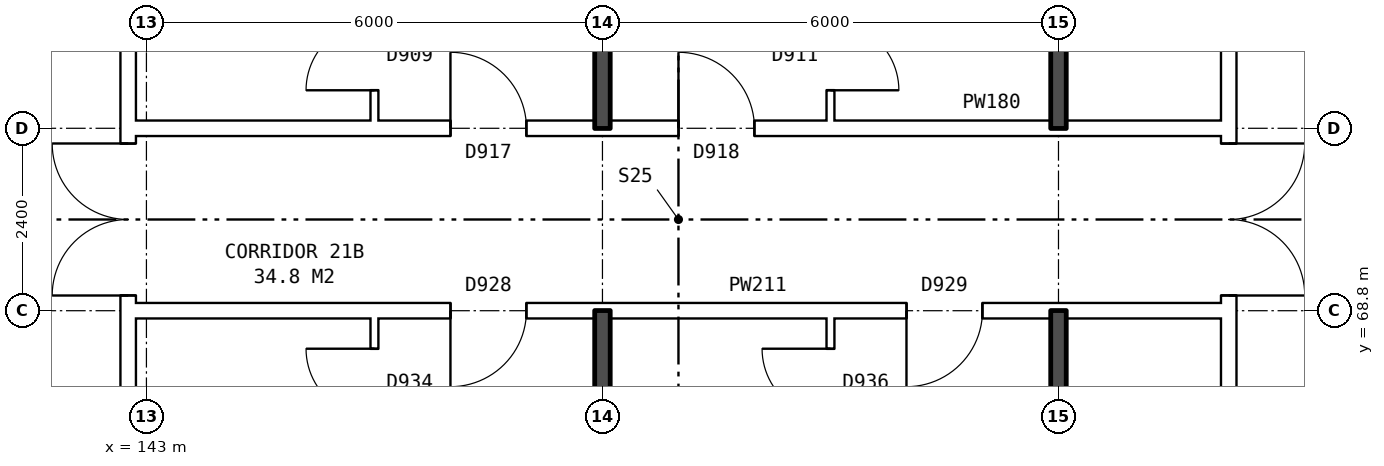
"""IFC4 building model, lengths in metres.
Left out: names, types, materials, properties, quantities, classifications, styles, units other than length and angle.
Written with IfcOpenShell. Run it as: python <this file> out.ifc"""

import sys

from ifc_helpers import new_model, si_unit, direction, frame, frame_2d, origin, place, context, subcontext, project, spatial, rectangle, extrude, element, fill, save


model = new_model("IFC4")
c1 = context("Model", 3, precision=1e-05, world=origin(), true_north=direction((0.0, 1.0)))
c2 = subcontext(c1, "Body", "Model", "MODEL_VIEW")
j1 = project(units=[si_unit("LENGTHUNIT", "METRE"), si_unit("PLANEANGLEUNIT", "RADIAN")], contexts=[c1])
p1 = place(None, origin())
s1 = spatial("IfcSite", under=j1, at=p1, CompositionType="ELEMENT")
p2 = place(p1, origin())
s2 = spatial("IfcBuilding", under=s1, at=p2, CompositionType="ELEMENT")
p3 = place(p2, frame((0.0, 0.0, 77.8)))
s3 = spatial("IfcBuildingStorey", under=s2, at=p3, CompositionType="ELEMENT", Elevation=77.8)
p4 = place(p3, frame((142.76, 63.9, 0.0), z_axis=(0.0, 0.0, 1.0), x_axis=(0.0, 1.0, 0.0)))
e1 = element("IfcWall", 1, at=p4, inside=s3, PredefinedType="PARTITIONING", context=c2, shape_type="SweptSolid", body=[
    extrude(rectangle(XDim=12.2, YDim=0.2, at=frame_2d((6.1, 0.0))), origin(), (0.0, 0.0, 1.0), 2.85),
])
p5 = place(p4, frame((5.1, 0.0, 0.0)))
e2 = element("IfcOpeningElement", 2, at=p5, cuts=e1, PredefinedType="OPENING", context=c2, shape_type="SweptSolid", body=[
    extrude(rectangle(XDim=2.0, YDim=2.1, at=frame_2d((1.0, 1.05))), frame((0.0, 0.11, 0.0), z_axis=(0.0, -1.0, 0.0), x_axis=(1.0, 0.0, 0.0)), (0.0, 0.0, 1.0), 0.22),
])
p6 = place(p3, frame((157.24, 63.9, 0.0), z_axis=(0.0, 0.0, 1.0), x_axis=(0.0, 1.0, 0.0)))
e3 = element("IfcWall", 3, at=p6, inside=s3, PredefinedType="PARTITIONING", context=c2, shape_type="SweptSolid", body=[
    extrude(rectangle(XDim=12.2, YDim=0.2, at=frame_2d((6.1, 0.0))), origin(), (0.0, 0.0, 1.0), 2.85),
])
p7 = place(p6, frame((5.1, 0.0, 0.0)))
e4 = element("IfcOpeningElement", 4, at=p7, cuts=e3, PredefinedType="OPENING", context=c2, shape_type="SweptSolid", body=[
    extrude(rectangle(XDim=2.0, YDim=2.1, at=frame_2d((1.0, 1.05))), frame((0.0, 0.11, 0.0), z_axis=(0.0, -1.0, 0.0), x_axis=(1.0, 0.0, 0.0)), (0.0, 0.0, 1.0), 0.22),
])
p8 = place(p3, frame((142.76, 68.8, 0.0), z_axis=(0.0, 0.0, 1.0), x_axis=(1.0, 0.0, 0.0)))
e5 = element("IfcWall", 5, at=p8, inside=s3, PredefinedType="PARTITIONING", context=c2, shape_type="SweptSolid", body=[
    extrude(rectangle(XDim=14.48, YDim=0.2, at=frame_2d((7.24, 0.0))), origin(), (0.0, 0.0, 1.0), 2.85),
])
p9 = place(p8, frame((4.24, 0.0, 0.0)))
e6 = element("IfcOpeningElement", 6, at=p9, cuts=e5, PredefinedType="OPENING", context=c2, shape_type="SweptSolid", body=[
    extrude(rectangle(XDim=1.0, YDim=2.1, at=frame_2d((0.5, 1.05))), frame((0.0, 0.11, 0.0), z_axis=(0.0, -1.0, 0.0), x_axis=(1.0, 0.0, 0.0)), (0.0, 0.0, 1.0), 0.22),
])
p10 = place(p8, frame((10.24, 0.0, 0.0)))
e7 = element("IfcOpeningElement", 7, at=p10, cuts=e5, PredefinedType="OPENING", context=c2, shape_type="SweptSolid", body=[
    extrude(rectangle(XDim=1.0, YDim=2.1, at=frame_2d((0.5, 1.05))), frame((0.0, 0.11, 0.0), z_axis=(0.0, -1.0, 0.0), x_axis=(1.0, 0.0, 0.0)), (0.0, 0.0, 1.0), 0.22),
])
p11 = place(p3, frame((142.76, 71.2, 0.0), z_axis=(0.0, 0.0, 1.0), x_axis=(1.0, 0.0, 0.0)))
e8 = element("IfcWall", 8, at=p11, inside=s3, PredefinedType="PARTITIONING", context=c2, shape_type="SweptSolid", body=[
    extrude(rectangle(XDim=14.48, YDim=0.2, at=frame_2d((7.24, 0.0))), origin(), (0.0, 0.0, 1.0), 2.85),
])
p12 = place(p11, frame((4.24, 0.0, 0.0)))
e9 = element("IfcOpeningElement", 9, at=p12, cuts=e8, PredefinedType="OPENING", context=c2, shape_type="SweptSolid", body=[
    extrude(rectangle(XDim=1.0, YDim=2.1, at=frame_2d((0.5, 1.05))), frame((0.0, 0.11, 0.0), z_axis=(0.0, -1.0, 0.0), x_axis=(1.0, 0.0, 0.0)), (0.0, 0.0, 1.0), 0.22),
])
p13 = place(p11, frame((7.24, 0.0, 0.0)))
e10 = element("IfcOpeningElement", 10, at=p13, cuts=e8, PredefinedType="OPENING", context=c2, shape_type="SweptSolid", body=[
    extrude(rectangle(XDim=1.0, YDim=2.1, at=frame_2d((0.5, 1.05))), frame((0.0, 0.11, 0.0), z_axis=(0.0, -1.0, 0.0), x_axis=(1.0, 0.0, 0.0)), (0.0, 0.0, 1.0), 0.22),
])
p14 = place(p3, frame((146.0, 54.36, 0.0), z_axis=(0.0, 0.0, 1.0), x_axis=(0.0, 1.0, 0.0)))
e11 = element("IfcWall", 11, at=p14, inside=s3, PredefinedType="PARTITIONING", context=c2, shape_type="SweptSolid", body=[
    extrude(rectangle(XDim=14.34, YDim=0.1, at=frame_2d((7.17, 0.0))), origin(), (0.0, 0.0, 1.0), 2.85),
])
p15 = place(p14, frame((4.2, 0.0, 0.0)))
e12 = element("IfcOpeningElement", 12, at=p15, cuts=e11, PredefinedType="OPENING", context=c2, shape_type="SweptSolid", body=[
    extrude(rectangle(XDim=0.9, YDim=2.1, at=frame_2d((0.45, 1.05))), frame((0.0, 0.06, 0.0), z_axis=(0.0, -1.0, 0.0), x_axis=(1.0, 0.0, 0.0)), (0.0, 0.0, 1.0), 0.12),
])
p16 = place(p14, frame((13.04, 0.0, 0.0)))
e13 = element("IfcOpeningElement", 13, at=p16, cuts=e11, PredefinedType="OPENING", context=c2, shape_type="SweptSolid", body=[
    extrude(rectangle(XDim=0.9, YDim=2.1, at=frame_2d((0.45, 1.05))), frame((0.0, 0.06, 0.0), z_axis=(0.0, -1.0, 0.0), x_axis=(1.0, 0.0, 0.0)), (0.0, 0.0, 1.0), 0.12),
])
p17 = place(p3, frame((146.0, 71.3, 0.0), z_axis=(0.0, 0.0, 1.0), x_axis=(0.0, 1.0, 0.0)))
e14 = element("IfcWall", 14, at=p17, inside=s3, PredefinedType="PARTITIONING", context=c2, shape_type="SweptSolid", body=[
    extrude(rectangle(XDim=14.34, YDim=0.1, at=frame_2d((7.17, 0.0))), origin(), (0.0, 0.0, 1.0), 2.85),
])
p18 = place(p17, frame((9.24, 0.0, 0.0)))
e15 = element("IfcOpeningElement", 15, at=p18, cuts=e14, PredefinedType="OPENING", context=c2, shape_type="SweptSolid", body=[
    extrude(rectangle(XDim=0.9, YDim=2.1, at=frame_2d((0.45, 1.05))), frame((0.0, 0.06, 0.0), z_axis=(0.0, -1.0, 0.0), x_axis=(1.0, 0.0, 0.0)), (0.0, 0.0, 1.0), 0.12),
])
p19 = place(p17, frame((0.4, 0.0, 0.0)))
e16 = element("IfcOpeningElement", 16, at=p19, cuts=e14, PredefinedType="OPENING", context=c2, shape_type="SweptSolid", body=[
    extrude(rectangle(XDim=0.9, YDim=2.1, at=frame_2d((0.45, 1.05))), frame((0.0, 0.06, 0.0), z_axis=(0.0, -1.0, 0.0), x_axis=(1.0, 0.0, 0.0)), (0.0, 0.0, 1.0), 0.12),
])
for number, where, z_axis, x_axis in (
    (17, (149.0, 54.36, 0.0), (0.0, 0.0, 1.0), (0.0, 1.0, 0.0)),
    (18, (149.0, 71.2, 0.0), (0.0, 0.0, 1.0), (0.0, 1.0, 0.0)),
):
    element("IfcWall", number, at=place(p3, frame(where, z_axis=z_axis, x_axis=x_axis)), inside=s3, PredefinedType="SOLIDWALL", context=c2, shape_type="SweptSolid", body=[
        extrude(rectangle(XDim=14.44, YDim=0.2, at=frame_2d((7.22, 0.0))), origin(), (0.0, 0.0, 1.0), 2.85),
    ])
p20 = place(p3, frame((152.0, 54.36, 0.0), z_axis=(0.0, 0.0, 1.0), x_axis=(0.0, 1.0, 0.0)))
e19 = element("IfcWall", 19, at=p20, inside=s3, PredefinedType="PARTITIONING", context=c2, shape_type="SweptSolid", body=[
    extrude(rectangle(XDim=14.34, YDim=0.1, at=frame_2d((7.17, 0.0))), origin(), (0.0, 0.0, 1.0), 2.85),
])
p21 = place(p20, frame((4.2, 0.0, 0.0)))
e20 = element("IfcOpeningElement", 20, at=p21, cuts=e19, PredefinedType="OPENING", context=c2, shape_type="SweptSolid", body=[
    extrude(rectangle(XDim=0.9, YDim=2.1, at=frame_2d((0.45, 1.05))), frame((0.0, 0.06, 0.0), z_axis=(0.0, -1.0, 0.0), x_axis=(1.0, 0.0, 0.0)), (0.0, 0.0, 1.0), 0.12),
])
p22 = place(p20, frame((13.04, 0.0, 0.0)))
e21 = element("IfcOpeningElement", 21, at=p22, cuts=e19, PredefinedType="OPENING", context=c2, shape_type="SweptSolid", body=[
    extrude(rectangle(XDim=0.9, YDim=2.1, at=frame_2d((0.45, 1.05))), frame((0.0, 0.06, 0.0), z_axis=(0.0, -1.0, 0.0), x_axis=(1.0, 0.0, 0.0)), (0.0, 0.0, 1.0), 0.12),
])
p23 = place(p3, frame((152.0, 71.3, 0.0), z_axis=(0.0, 0.0, 1.0), x_axis=(0.0, 1.0, 0.0)))
e22 = element("IfcWall", 22, at=p23, inside=s3, PredefinedType="PARTITIONING", context=c2, shape_type="SweptSolid", body=[
    extrude(rectangle(XDim=14.34, YDim=0.1, at=frame_2d((7.17, 0.0))), origin(), (0.0, 0.0, 1.0), 2.85),
])
p24 = place(p23, frame((7.94, 0.0, 0.0)))
e23 = element("IfcOpeningElement", 23, at=p24, cuts=e22, PredefinedType="OPENING", context=c2, shape_type="SweptSolid", body=[
    extrude(rectangle(XDim=0.9, YDim=2.1, at=frame_2d((0.45, 1.05))), frame((0.0, 0.06, 0.0), z_axis=(0.0, -1.0, 0.0), x_axis=(1.0, 0.0, 0.0)), (0.0, 0.0, 1.0), 0.12),
])
p25 = place(p23, frame((0.4, 0.0, 0.0)))
e24 = element("IfcOpeningElement", 24, at=p25, cuts=e22, PredefinedType="OPENING", context=c2, shape_type="SweptSolid", body=[
    extrude(rectangle(XDim=0.9, YDim=2.1, at=frame_2d((0.45, 1.05))), frame((0.0, 0.06, 0.0), z_axis=(0.0, -1.0, 0.0), x_axis=(1.0, 0.0, 0.0)), (0.0, 0.0, 1.0), 0.12),
])
for number, where, z_axis, x_axis in (
    (25, (155.0, 63.8, 0.0), (0.0, 0.0, 1.0), (0.0, 1.0, 0.0)),
    (26, (155.0, 71.2, 0.0), (0.0, 0.0, 1.0), (0.0, 1.0, 0.0)),
):
    element("IfcWall", number, at=place(p3, frame(where, z_axis=z_axis, x_axis=x_axis)), inside=s3, PredefinedType="SOLIDWALL", context=c2, shape_type="SweptSolid", body=[
        extrude(rectangle(XDim=5.0, YDim=0.2, at=frame_2d((2.5, 0.0))), origin(), (0.0, 0.0, 1.0), 2.85),
    ])
p26 = place(p5, origin())
e27 = element("IfcDoor", 27, at=p26, inside=s3, OperationType="DOUBLE_DOOR_SINGLE_SWING", PredefinedType="DOOR", context=c2, shape_type="SweptSolid", body=[
    extrude(rectangle(XDim=2.0, YDim=2.1, at=frame_2d((1.0, 1.05))), frame((0.0, 0.025, 0.0), z_axis=(0.0, -1.0, 0.0), x_axis=(1.0, 0.0, 0.0)), (0.0, 0.0, 1.0), 0.05),
])
fill(e2, e27)
p27 = place(p7, frame((2.0, 0.0, 0.0), z_axis=(0.0, 0.0, 1.0), x_axis=(-1.0, 0.0, 0.0)))
e28 = element("IfcDoor", 28, at=p27, inside=s3, OperationType="DOUBLE_DOOR_SINGLE_SWING", PredefinedType="DOOR", context=c2, shape_type="SweptSolid", body=[
    extrude(rectangle(XDim=2.0, YDim=2.1, at=frame_2d((1.0, 1.05))), frame((0.0, 0.025, 0.0), z_axis=(0.0, -1.0, 0.0), x_axis=(1.0, 0.0, 0.0)), (0.0, 0.0, 1.0), 0.05),
])
fill(e4, e28)
p28 = place(p9, frame((1.0, 0.0, 0.0), z_axis=(0.0, 0.0, 1.0), x_axis=(-1.0, 0.0, 0.0)))
e29 = element("IfcDoor", 29, at=p28, inside=s3, OperationType="SINGLE_SWING_RIGHT", PredefinedType="DOOR", context=c2, shape_type="SweptSolid", body=[
    extrude(rectangle(XDim=1.0, YDim=2.1, at=frame_2d((0.5, 1.05))), frame((0.0, 0.025, 0.0), z_axis=(0.0, -1.0, 0.0), x_axis=(1.0, 0.0, 0.0)), (0.0, 0.0, 1.0), 0.05),
])
fill(e6, e29)
p29 = place(p16, origin())
e30 = element("IfcDoor", 30, at=p29, inside=s3, OperationType="SINGLE_SWING_RIGHT", PredefinedType="DOOR", context=c2, shape_type="SweptSolid", body=[
    extrude(rectangle(XDim=0.9, YDim=2.1, at=frame_2d((0.45, 1.05))), frame((0.0, 0.025, 0.0), z_axis=(0.0, -1.0, 0.0), x_axis=(1.0, 0.0, 0.0)), (0.0, 0.0, 1.0), 0.05),
])
fill(e13, e30)
p30 = place(p10, frame((1.0, 0.0, 0.0), z_axis=(0.0, 0.0, 1.0), x_axis=(-1.0, 0.0, 0.0)))
e31 = element("IfcDoor", 31, at=p30, inside=s3, OperationType="SINGLE_SWING_RIGHT", PredefinedType="DOOR", context=c2, shape_type="SweptSolid", body=[
    extrude(rectangle(XDim=1.0, YDim=2.1, at=frame_2d((0.5, 1.05))), frame((0.0, 0.025, 0.0), z_axis=(0.0, -1.0, 0.0), x_axis=(1.0, 0.0, 0.0)), (0.0, 0.0, 1.0), 0.05),
])
fill(e7, e31)
p31 = place(p22, origin())
e32 = element("IfcDoor", 32, at=p31, inside=s3, OperationType="SINGLE_SWING_RIGHT", PredefinedType="DOOR", context=c2, shape_type="SweptSolid", body=[
    extrude(rectangle(XDim=0.9, YDim=2.1, at=frame_2d((0.45, 1.05))), frame((0.0, 0.025, 0.0), z_axis=(0.0, -1.0, 0.0), x_axis=(1.0, 0.0, 0.0)), (0.0, 0.0, 1.0), 0.05),
])
fill(e21, e32)
p32 = place(p12, origin())
e33 = element("IfcDoor", 33, at=p32, inside=s3, OperationType="SINGLE_SWING_LEFT", PredefinedType="DOOR", context=c2, shape_type="SweptSolid", body=[
    extrude(rectangle(XDim=1.0, YDim=2.1, at=frame_2d((0.5, 1.05))), frame((0.0, 0.025, 0.0), z_axis=(0.0, -1.0, 0.0), x_axis=(1.0, 0.0, 0.0)), (0.0, 0.0, 1.0), 0.05),
])
fill(e9, e33)
p33 = place(p19, origin())
e34 = element("IfcDoor", 34, at=p33, inside=s3, OperationType="SINGLE_SWING_LEFT", PredefinedType="DOOR", context=c2, shape_type="SweptSolid", body=[
    extrude(rectangle(XDim=0.9, YDim=2.1, at=frame_2d((0.45, 1.05))), frame((0.0, 0.025, 0.0), z_axis=(0.0, -1.0, 0.0), x_axis=(1.0, 0.0, 0.0)), (0.0, 0.0, 1.0), 0.05),
])
fill(e16, e34)
p34 = place(p13, origin())
e35 = element("IfcDoor", 35, at=p34, inside=s3, OperationType="SINGLE_SWING_LEFT", PredefinedType="DOOR", context=c2, shape_type="SweptSolid", body=[
    extrude(rectangle(XDim=1.0, YDim=2.1, at=frame_2d((0.5, 1.05))), frame((0.0, 0.025, 0.0), z_axis=(0.0, -1.0, 0.0), x_axis=(1.0, 0.0, 0.0)), (0.0, 0.0, 1.0), 0.05),
])
fill(e10, e35)
p35 = place(p25, frame((0.9, 0.0, 0.0), z_axis=(0.0, 0.0, 1.0), x_axis=(-1.0, 0.0, 0.0)))
e36 = element("IfcDoor", 36, at=p35, inside=s3, OperationType="SINGLE_SWING_RIGHT", PredefinedType="DOOR", context=c2, shape_type="SweptSolid", body=[
    extrude(rectangle(XDim=0.9, YDim=2.1, at=frame_2d((0.45, 1.05))), frame((0.0, 0.025, 0.0), z_axis=(0.0, -1.0, 0.0), x_axis=(1.0, 0.0, 0.0)), (0.0, 0.0, 1.0), 0.05),
])
fill(e24, e36)
save(model, sys.argv[1])
